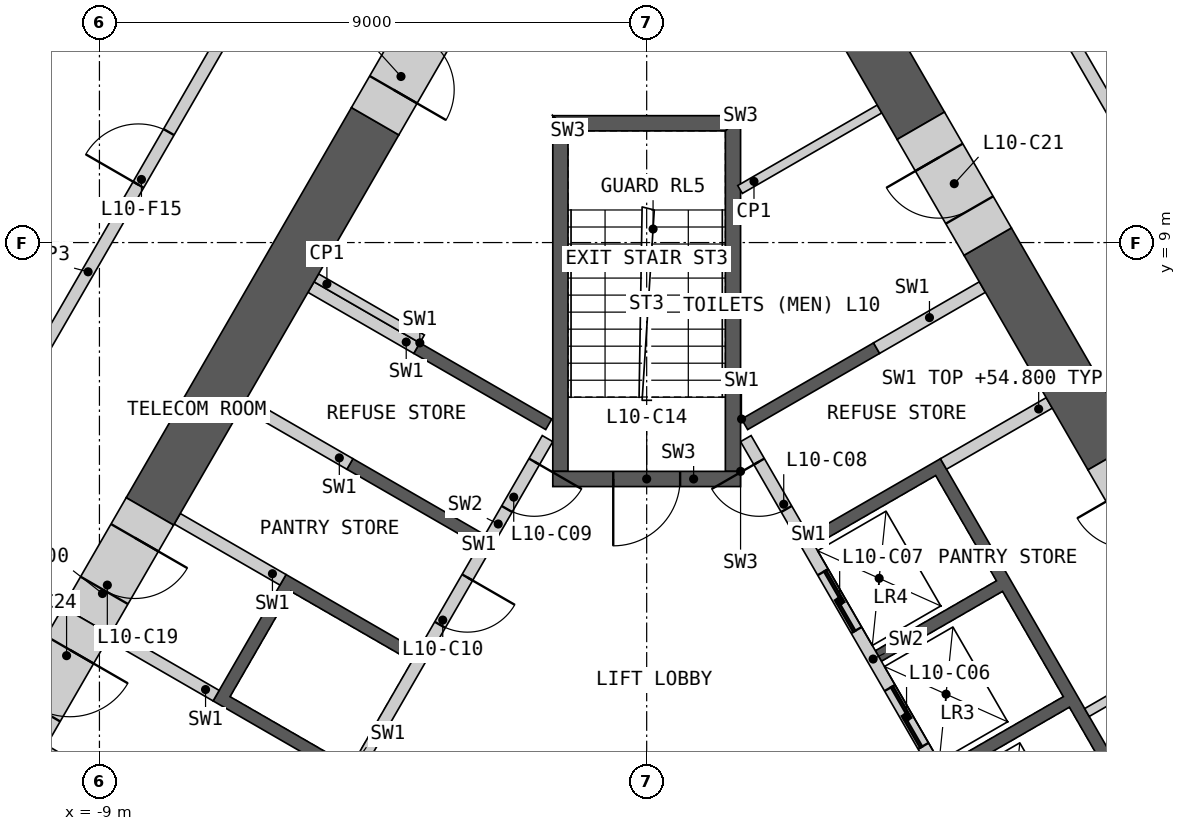
"""IFC4 building model, lengths in metres.
Left out: names, types, materials, properties, quantities, classifications, styles, units other than length and angle.
Written with IfcOpenShell. Run it as: python <this file> out.ifc"""

import sys

from ifc_helpers import new_model, si_unit, direction, frame, frame_2d, origin, place, context, subcontext, project, spatial, polyline, rectangle, outline, extrude, element, fill, save


model = new_model("IFC4")
c1 = context("Model", 3, precision=1e-05, world=origin(), true_north=direction((0.0, 1.0)))
c2 = subcontext(c1, "Body", "Model", "MODEL_VIEW")
j1 = project(units=[si_unit("LENGTHUNIT", "METRE"), si_unit("PLANEANGLEUNIT", "RADIAN")], contexts=[c1])
p1 = place(None, origin())
s1 = spatial("IfcSite", under=j1, at=p1, CompositionType="ELEMENT")
p2 = place(p1, origin())
s2 = spatial("IfcBuilding", under=s1, at=p2, CompositionType="ELEMENT")
p3 = place(p2, frame((0.0, 0.0, 51.0)))
s3 = spatial("IfcBuildingStorey", under=s2, at=p3, CompositionType="ELEMENT", Elevation=51.0)
p4 = place(p3, origin())
e1 = element("IfcWall", 1, at=p4, inside=s3, PredefinedType="SHEAR", context=c2, shape_type="SweptSolid", body=[
    extrude(outline(polyline([(1.561, 6.097), (3.731, 7.35), (3.831, 7.177), (1.66, 5.924), (1.561, 6.097)])), origin(), (0.0, 0.0, 1.0), 3.8),
])
p5 = place(p3, origin())
e2 = element("IfcWall", 2, at=p5, inside=s3, PredefinedType="SHEAR", context=c2, shape_type="SweptSolid", body=[
    extrude(outline(polyline([(2.66, 4.192), (4.831, 5.445), (8.231, -0.444), (6.061, -1.697), (5.96, -1.524), (7.952, -0.374), (6.952, 1.358), (4.96, 0.208), (4.861, 0.381), (6.852, 1.531), (5.852, 3.263), (3.861, 2.113), (3.76, 2.287), (5.752, 3.437), (4.752, 5.169), (2.76, 4.019), (2.66, 4.192)])), origin(), (0.0, 0.0, 1.0), 3.8),
])
p6 = place(p3, frame((5.817, -1.476, 0.0), z_axis=(0.0, 0.0, 1.0), x_axis=(-0.500002616675, 0.866023893041, 0.0)))
e3 = element("IfcWall", 3, at=p6, inside=s3, PredefinedType="SOLIDWALL", context=c2, shape_type="SweptSolid", body=[
    extrude(rectangle(XDim=8.373, YDim=0.2, at=frame_2d((4.187, 0.0))), origin(), (0.0, 0.0, 1.0), 3.8),
])
p7 = place(p6, frame((0.337, 0.0, 0.0)))
e4 = element("IfcOpeningElement", 4, at=p7, cuts=e3, PredefinedType="OPENING", context=c2, shape_type="SweptSolid", body=[
    extrude(rectangle(XDim=1.1, YDim=2.1, at=frame_2d((0.55, 1.05))), frame((0.0, 0.11, 0.0), z_axis=(0.0, -1.0, 0.0), x_axis=(1.0, 0.0, 0.0)), (0.0, 0.0, 1.0), 0.22),
])
p8 = place(p6, frame((2.537, 0.0, 0.0)))
e5 = element("IfcOpeningElement", 5, at=p8, cuts=e3, PredefinedType="OPENING", context=c2, shape_type="SweptSolid", body=[
    extrude(rectangle(XDim=1.1, YDim=2.1, at=frame_2d((0.55, 1.05))), frame((0.0, 0.11, 0.0), z_axis=(0.0, -1.0, 0.0), x_axis=(1.0, 0.0, 0.0)), (0.0, 0.0, 1.0), 0.22),
])
p9 = place(p6, frame((4.737, 0.0, 0.0)))
e6 = element("IfcOpeningElement", 6, at=p9, cuts=e3, PredefinedType="OPENING", context=c2, shape_type="SweptSolid", body=[
    extrude(rectangle(XDim=1.1, YDim=2.1, at=frame_2d((0.55, 1.05))), frame((0.0, 0.11, 0.0), z_axis=(0.0, -1.0, 0.0), x_axis=(1.0, 0.0, 0.0)), (0.0, 0.0, 1.0), 0.22),
])
p10 = place(p6, frame((7.037, 0.0, 0.0)))
e7 = element("IfcOpeningElement", 7, at=p10, cuts=e3, PredefinedType="OPENING", context=c2, shape_type="SweptSolid", body=[
    extrude(rectangle(XDim=0.9, YDim=2.1, at=frame_2d((0.45, 1.05))), frame((0.0, 0.11, 0.0), z_axis=(0.0, -1.0, 0.0), x_axis=(1.0, 0.0, 0.0)), (0.0, 0.0, 1.0), 0.22),
])
p11 = place(p3, frame((4.881, 5.358, 0.0), z_axis=(0.0, 0.0, 1.0), x_axis=(0.866035824272, 0.499981950752, 0.0)))
e8 = element("IfcWall", 8, at=p11, inside=s3, PredefinedType="SHEAR", context=c2, shape_type="SweptSolid", body=[
    extrude(rectangle(XDim=2.009, YDim=0.2, at=frame_2d((1.004, 0.0))), origin(), (0.0, 0.0, 1.0), 3.8),
])
p12 = place(p3, frame((3.781, 7.263, 0.0), z_axis=(0.0, 0.0, 1.0), x_axis=(0.865983199114, 0.50007309351, 0.0)))
e9 = element("IfcWall", 9, at=p12, inside=s3, PredefinedType="SHEAR", context=c2, shape_type="SweptSolid", body=[
    extrude(rectangle(XDim=2.009, YDim=0.2, at=frame_2d((1.004, 0.0))), origin(), (0.0, 0.0, 1.0), 3.8),
])
p13 = place(p3, origin())
e10 = element("IfcWall", 10, at=p13, inside=s3, PredefinedType="SHEAR", context=c2, shape_type="SweptSolid", body=[
    extrude(outline(polyline([(-4.96, 0.208), (-7.131, 1.461), (-5.931, 3.54), (-3.76, 2.287), (-3.861, 2.113), (-5.852, 3.263), (-6.852, 1.531), (-4.861, 0.381), (-4.96, 0.208)])), origin(), (0.0, 0.0, 1.0), 3.8),
])
p14 = place(p3, origin())
e11 = element("IfcWall", 11, at=p14, inside=s3, PredefinedType="SHEAR", context=c2, shape_type="SweptSolid", body=[
    extrude(outline(polyline([(-2.76, 4.019), (-4.931, 5.272), (-4.831, 5.445), (-2.66, 4.192), (-2.76, 4.019)])), origin(), (0.0, 0.0, 1.0), 3.8),
])
p15 = place(p3, origin())
e12 = element("IfcWall", 12, at=p15, inside=s3, PredefinedType="SHEAR", context=c2, shape_type="SweptSolid", body=[
    extrude(outline(polyline([(-3.731, 7.35), (-1.561, 6.097), (-1.66, 5.924), (-3.831, 7.177), (-3.731, 7.35)])), origin(), (0.0, 0.0, 1.0), 3.8),
])
p16 = place(p3, frame((-1.631, 5.776, 0.0), z_axis=(0.0, 0.0, 1.0), x_axis=(-0.499992876559, -0.866029516466, 0.0)))
e13 = element("IfcWall", 13, at=p16, inside=s3, PredefinedType="SOLIDWALL", context=c2, shape_type="SweptSolid", body=[
    extrude(rectangle(XDim=6.486, YDim=0.2, at=frame_2d((3.243, 0.0))), origin(), (0.0, 0.0, 1.0), 3.8),
])
p17 = place(p16, frame((0.437, 0.0, 0.0)))
e14 = element("IfcOpeningElement", 14, at=p17, cuts=e13, PredefinedType="OPENING", context=c2, shape_type="SweptSolid", body=[
    extrude(rectangle(XDim=0.9, YDim=2.1, at=frame_2d((0.45, 1.05))), frame((0.0, 0.11, 0.0), z_axis=(0.0, -1.0, 0.0), x_axis=(1.0, 0.0, 0.0)), (0.0, 0.0, 1.0), 0.22),
])
p18 = place(p16, frame((2.637, 0.0, 0.0)))
e15 = element("IfcOpeningElement", 15, at=p18, cuts=e13, PredefinedType="OPENING", context=c2, shape_type="SweptSolid", body=[
    extrude(rectangle(XDim=0.9, YDim=2.1, at=frame_2d((0.45, 1.05))), frame((0.0, 0.11, 0.0), z_axis=(0.0, -1.0, 0.0), x_axis=(1.0, 0.0, 0.0)), (0.0, 0.0, 1.0), 0.22),
])
p19 = place(p3, frame((-3.781, 7.263, 0.0), z_axis=(0.0, 0.0, 1.0), x_axis=(-0.865983199114, 0.50007309351, 0.0)))
e16 = element("IfcWall", 16, at=p19, inside=s3, PredefinedType="SHEAR", context=c2, shape_type="SweptSolid", body=[
    extrude(rectangle(XDim=2.009, YDim=0.2, at=frame_2d((1.004, 0.0))), origin(), (0.0, 0.0, 1.0), 3.8),
])
p20 = place(p3, frame((-4.881, 5.358, 0.0), z_axis=(0.0, 0.0, 1.0), x_axis=(-0.866035824272, 0.499981950752, 0.0)))
e17 = element("IfcWall", 17, at=p20, inside=s3, PredefinedType="SHEAR", context=c2, shape_type="SweptSolid", body=[
    extrude(rectangle(XDim=2.009, YDim=0.2, at=frame_2d((1.004, 0.0))), origin(), (0.0, 0.0, 1.0), 3.8),
])
p21 = place(p3, frame((-5.981, 3.453, 0.0), z_axis=(0.0, 0.0, 1.0), x_axis=(-0.866013584312, 0.500020471368, 0.0)))
e18 = element("IfcWall", 18, at=p21, inside=s3, PredefinedType="SHEAR", context=c2, shape_type="SweptSolid", body=[
    extrude(rectangle(XDim=2.009, YDim=0.2, at=frame_2d((1.005, 0.0))), origin(), (0.0, 0.0, 1.0), 3.8),
])
p22 = place(p3, frame((-7.081, 1.548, 0.0), z_axis=(0.0, 0.0, 1.0), x_axis=(-0.865983199114, 0.50007309351, 0.0)))
e19 = element("IfcWall", 19, at=p22, inside=s3, PredefinedType="SHEAR", context=c2, shape_type="SweptSolid", body=[
    extrude(rectangle(XDim=2.009, YDim=0.2, at=frame_2d((1.004, 0.0))), origin(), (0.0, 0.0, 1.0), 3.8),
])
p23 = place(p3, frame((-8.181, -0.357, 0.0), z_axis=(0.0, 0.0, 1.0), x_axis=(-0.866035824272, 0.499981950752, 0.0)))
e20 = element("IfcWall", 20, at=p23, inside=s3, PredefinedType="SHEAR", context=c2, shape_type="SweptSolid", body=[
    extrude(rectangle(XDim=2.009, YDim=0.2, at=frame_2d((1.004, 0.0))), origin(), (0.0, 0.0, 1.0), 3.8),
])
p24 = place(p3, origin())
e21 = element("IfcWall", 21, at=p24, inside=s3, PredefinedType="SHEAR", context=c2, shape_type="SweptSolid", body=[
    extrude(outline(polyline([(1.544, 5.237), (1.544, 11.087), (1.294, 10.837), (1.294, 5.237), (1.544, 5.237)])), origin(), (0.0, 0.0, 1.0), 3.8),
])
p25 = place(p3, origin())
e22 = element("IfcWall", 22, at=p25, inside=s3, PredefinedType="SHEAR", context=c2, shape_type="SweptSolid", body=[
    extrude(outline(polyline([(1.544, 11.087), (-1.544, 11.087), (-1.294, 10.837), (1.294, 10.837), (1.544, 11.087)])), origin(), (0.0, 0.0, 1.0), 3.8),
])
p26 = place(p3, origin())
e23 = element("IfcWall", 23, at=p26, inside=s3, PredefinedType="SHEAR", context=c2, shape_type="SweptSolid", body=[
    extrude(outline(polyline([(-1.294, 10.837), (-1.544, 11.087), (-1.544, 5.237), (-1.294, 5.237), (-1.294, 10.837)])), origin(), (0.0, 0.0, 1.0), 3.8),
])
p27 = place(p3, frame((1.544, 5.112, 0.0), z_axis=(0.0, 0.0, 1.0), x_axis=(-1.0, 0.0, 0.0)))
e24 = element("IfcWall", 24, at=p27, inside=s3, PredefinedType="SHEAR", context=c2, shape_type="SweptSolid", body=[
    extrude(rectangle(XDim=3.088, YDim=0.25, at=frame_2d((1.544, 0.0))), origin(), (0.0, 0.0, 1.0), 3.8),
])
p28 = place(p27, frame((0.994, 0.0, 0.0)))
e25 = element("IfcOpeningElement", 25, at=p28, cuts=e24, PredefinedType="OPENING", context=c2, shape_type="SweptSolid", body=[
    extrude(rectangle(XDim=1.1, YDim=2.1, at=frame_2d((0.55, 1.05))), frame((0.0, 0.135, 0.0), z_axis=(0.0, -1.0, 0.0), x_axis=(1.0, 0.0, 0.0)), (0.0, 0.0, 1.0), 0.27),
])
p29 = place(p3, frame((-3.693, 7.415, 0.0), z_axis=(0.0, 0.0, 1.0), x_axis=(-0.866035824272, 0.499981950752, 0.0)))
e26 = element("IfcWall", 26, at=p29, inside=s3, PredefinedType="PARTITIONING", context=c2, shape_type="SweptSolid", body=[
    extrude(rectangle(XDim=2.009, YDim=0.15, at=frame_2d((1.004, 0.0))), origin(), (0.0, 0.0, 1.0), 3.8),
])
p30 = place(p3, frame((3.829, 11.197, 0.0), z_axis=(0.0, 0.0, 1.0), x_axis=(-0.866016748302, -0.500014991436, 0.0)))
e27 = element("IfcWall", 27, at=p30, inside=s3, PredefinedType="PARTITIONING", context=c2, shape_type="SweptSolid", body=[
    extrude(rectangle(XDim=2.649, YDim=0.15, at=frame_2d((1.324, 0.0))), origin(), (0.0, 0.0, 1.0), 3.8),
])
p31 = place(p3, frame((8.981, 2.275, 0.0), z_axis=(0.0, 0.0, 1.0), x_axis=(-0.866013584312, -0.500020471368, 0.0)))
e28 = element("IfcWall", 28, at=p31, inside=s3, PredefinedType="PARTITIONING", context=c2, shape_type="SweptSolid", body=[
    extrude(rectangle(XDim=2.009, YDim=0.15, at=frame_2d((1.005, 0.0))), origin(), (0.0, 0.0, 1.0), 3.8),
])
p32 = place(p3, frame((7.646, 5.486, 0.0), z_axis=(0.0, 0.0, 1.0), x_axis=(-0.499978218965, 0.866037978706, 0.0)))
e29 = element("IfcWall", 29, at=p32, inside=s3, PredefinedType="SHEAR", context=c2, shape_type="SweptSolid", body=[
    extrude(rectangle(XDim=4.076, YDim=0.9, at=frame_2d((2.038, 0.0))), origin(), (0.0, 0.0, 1.0), 3.8),
])
p33 = place(p3, frame((4.509, 10.921, 0.0), z_axis=(0.0, 0.0, 1.0), x_axis=(-0.49999004381, 0.866031151917, 0.0)))
e30 = element("IfcWall", 30, at=p33, inside=s3, PredefinedType="SHEAR", context=c2, shape_type="SweptSolid", body=[
    extrude(rectangle(XDim=3.975, YDim=0.9, at=frame_2d((1.988, 0.0))), origin(), (0.0, 0.0, 1.0), 3.8),
])
p34 = place(p3, frame((-4.466, 10.995, 0.0), z_axis=(0.0, 0.0, 1.0), x_axis=(-0.500012427149, -0.866018228848, 0.0)))
e31 = element("IfcWall", 31, at=p34, inside=s3, PredefinedType="SHEAR", context=c2, shape_type="SweptSolid", body=[
    extrude(rectangle(XDim=7.409, YDim=0.9, at=frame_2d((3.705, 0.0))), origin(), (0.0, 0.0, 1.0), 3.8),
])
p35 = place(p3, frame((-8.17, 4.579, 0.0), z_axis=(0.0, 0.0, 1.0), x_axis=(-0.499888406853, -0.866089822532, 0.0)))
e32 = element("IfcWall", 32, at=p35, inside=s3, PredefinedType="SHEAR", context=c2, shape_type="SweptSolid", body=[
    extrude(rectangle(XDim=2.08, YDim=0.9, at=frame_2d((1.04, 0.0))), origin(), (0.0, 0.0, 1.0), 3.8),
])
p36 = place(p35, frame((0.5, 0.0, 0.0)))
e33 = element("IfcOpeningElement", 33, at=p36, cuts=e32, PredefinedType="OPENING", context=c2, shape_type="SweptSolid", body=[
    extrude(rectangle(XDim=1.0, YDim=2.1, at=frame_2d((0.5, 1.05))), frame((0.0, 0.46, 0.0), z_axis=(0.0, -1.0, 0.0), x_axis=(1.0, 0.0, 0.0)), (0.0, 0.0, 1.0), 0.92),
])
p37 = place(p3, frame((8.747, 3.58, 0.0), z_axis=(0.0, 0.0, 1.0), x_axis=(-0.50002983664, 0.866008176907, 0.0)))
e34 = element("IfcWall", 34, at=p37, inside=s3, PredefinedType="SHEAR", context=c2, shape_type="SweptSolid", body=[
    extrude(rectangle(XDim=2.2, YDim=0.9, at=frame_2d((1.1, 0.0))), origin(), (0.0, 0.0, 1.0), 3.8),
])
p38 = place(p37, frame((0.6, 0.0, 0.0)))
e35 = element("IfcOpeningElement", 35, at=p38, cuts=e34, PredefinedType="OPENING", context=c2, shape_type="SweptSolid", body=[
    extrude(rectangle(XDim=1.0, YDim=2.1, at=frame_2d((0.5, 1.05))), frame((0.0, 0.46, 0.0), z_axis=(0.0, -1.0, 0.0), x_axis=(1.0, 0.0, 0.0)), (0.0, 0.0, 1.0), 0.92),
])
p39 = place(p3, frame((5.608, 9.016, 0.0), z_axis=(0.0, 0.0, 1.0), x_axis=(-0.499994660107, 0.866028486751, 0.0)))
e36 = element("IfcWall", 36, at=p39, inside=s3, PredefinedType="SHEAR", context=c2, shape_type="SweptSolid", body=[
    extrude(rectangle(XDim=2.2, YDim=0.9, at=frame_2d((1.1, 0.0))), origin(), (0.0, 0.0, 1.0), 3.8),
])
p40 = place(p39, frame((0.6, 0.0, 0.0)))
e37 = element("IfcOpeningElement", 37, at=p40, cuts=e36, PredefinedType="OPENING", context=c2, shape_type="SweptSolid", body=[
    extrude(rectangle(XDim=1.0, YDim=2.1, at=frame_2d((0.5, 1.05))), frame((0.0, 0.46, 0.0), z_axis=(0.0, -1.0, 0.0), x_axis=(1.0, 0.0, 0.0)), (0.0, 0.0, 1.0), 0.92),
])
p41 = place(p3, frame((-3.365, 12.9, 0.0), z_axis=(0.0, 0.0, 1.0), x_axis=(-0.500077893725, -0.86598042715, 0.0)))
e38 = element("IfcWall", 38, at=p41, inside=s3, PredefinedType="SHEAR", context=c2, shape_type="SweptSolid", body=[
    extrude(rectangle(XDim=2.2, YDim=0.9, at=frame_2d((1.1, 0.0))), origin(), (0.0, 0.0, 1.0), 3.8),
])
p42 = place(p41, frame((0.6, 0.0, 0.0)))
e39 = element("IfcOpeningElement", 39, at=p42, cuts=e38, PredefinedType="OPENING", context=c2, shape_type="SweptSolid", body=[
    extrude(rectangle(XDim=1.0, YDim=2.1, at=frame_2d((0.5, 1.05))), frame((0.0, 0.46, 0.0), z_axis=(0.0, -1.0, 0.0), x_axis=(1.0, 0.0, 0.0)), (0.0, 0.0, 1.0), 0.92),
])
p43 = place(p3, frame((-9.21, 2.777, 0.0), z_axis=(0.0, 0.0, 1.0), x_axis=(-0.500077893725, -0.86598042715, 0.0)))
e40 = element("IfcWall", 40, at=p43, inside=s3, PredefinedType="SHEAR", context=c2, shape_type="SweptSolid", body=[
    extrude(rectangle(XDim=2.2, YDim=0.9, at=frame_2d((1.1, 0.0))), origin(), (0.0, 0.0, 1.0), 3.8),
])
p44 = place(p43, frame((0.55, 0.0, 0.0)))
e41 = element("IfcOpeningElement", 41, at=p44, cuts=e40, PredefinedType="OPENING", context=c2, shape_type="SweptSolid", body=[
    extrude(rectangle(XDim=1.1, YDim=2.1, at=frame_2d((0.55, 1.05))), frame((0.0, 0.46, 0.0), z_axis=(0.0, -1.0, 0.0), x_axis=(1.0, 0.0, 0.0)), (0.0, 0.0, 1.0), 0.92),
])
p45 = place(p3, frame((-10.439, 6.35, 0.0), z_axis=(0.0, 0.0, 1.0), x_axis=(0.50001002959, 0.86601961312, 0.0)))
e42 = element("IfcWall", 42, at=p45, inside=s3, PredefinedType="PARTITIONING", context=c2, shape_type="SweptSolid", body=[
    extrude(rectangle(XDim=10.019, YDim=0.2, at=frame_2d((5.009, 0.0))), origin(), (0.0, 0.0, 1.0), 3.8),
])
p46 = place(p45, frame((4.159, 0.0, 0.0)))
e43 = element("IfcOpeningElement", 43, at=p46, cuts=e42, PredefinedType="OPENING", context=c2, shape_type="SweptSolid", body=[
    extrude(rectangle(XDim=1.0, YDim=2.1, at=frame_2d((0.5, 1.05))), frame((0.0, 0.11, 0.0), z_axis=(0.0, -1.0, 0.0), x_axis=(1.0, 0.0, 0.0)), (0.0, 0.0, 1.0), 0.22),
])
p47 = place(p3, frame((5.429, 15.026, 0.0), z_axis=(0.0, 0.0, 1.0), x_axis=(0.50001002959, -0.86601961312, 0.0)))
e44 = element("IfcWall", 44, at=p47, inside=s3, PredefinedType="PARTITIONING", context=c2, shape_type="SweptSolid", body=[
    extrude(rectangle(XDim=10.019, YDim=0.2, at=frame_2d((5.009, 0.0))), origin(), (0.0, 0.0, 1.0), 3.8),
])
p48 = place(p47, frame((4.86, 0.0, 0.0)))
e45 = element("IfcOpeningElement", 45, at=p48, cuts=e44, PredefinedType="OPENING", context=c2, shape_type="SweptSolid", body=[
    extrude(rectangle(XDim=1.0, YDim=2.1, at=frame_2d((0.5, 1.05))), frame((0.0, 0.11, 0.0), z_axis=(0.0, -1.0, 0.0), x_axis=(1.0, 0.0, 0.0)), (0.0, 0.0, 1.0), 0.22),
])
p49 = place(p8, origin())
e46 = element("IfcDoor", 46, at=p49, inside=s3, OperationType="SLIDING_TO_LEFT", PredefinedType="DOOR", context=c2, shape_type="SweptSolid", body=[
    extrude(rectangle(XDim=1.1, YDim=2.1, at=frame_2d((0.55, 1.05))), frame((0.0, 0.025, 0.0), z_axis=(0.0, -1.0, 0.0), x_axis=(1.0, 0.0, 0.0)), (0.0, 0.0, 1.0), 0.05),
])
fill(e5, e46)
p50 = place(p9, origin())
e47 = element("IfcDoor", 47, at=p50, inside=s3, OperationType="SLIDING_TO_LEFT", PredefinedType="DOOR", context=c2, shape_type="SweptSolid", body=[
    extrude(rectangle(XDim=1.1, YDim=2.1, at=frame_2d((0.55, 1.05))), frame((0.0, 0.025, 0.0), z_axis=(0.0, -1.0, 0.0), x_axis=(1.0, 0.0, 0.0)), (0.0, 0.0, 1.0), 0.05),
])
fill(e6, e47)
p51 = place(p10, origin())
e48 = element("IfcDoor", 48, at=p51, inside=s3, OperationType="SINGLE_SWING_RIGHT", PredefinedType="DOOR", context=c2, shape_type="SweptSolid", body=[
    extrude(rectangle(XDim=0.9, YDim=2.1, at=frame_2d((0.45, 1.05))), frame((0.0, 0.025, 0.0), z_axis=(0.0, -1.0, 0.0), x_axis=(1.0, 0.0, 0.0)), (0.0, 0.0, 1.0), 0.05),
])
fill(e7, e48)
p52 = place(p17, origin())
e49 = element("IfcDoor", 49, at=p52, inside=s3, OperationType="SINGLE_SWING_LEFT", PredefinedType="DOOR", context=c2, shape_type="SweptSolid", body=[
    extrude(rectangle(XDim=0.9, YDim=2.1, at=frame_2d((0.45, 1.05))), frame((0.0, 0.025, 0.0), z_axis=(0.0, -1.0, 0.0), x_axis=(1.0, 0.0, 0.0)), (0.0, 0.0, 1.0), 0.05),
])
fill(e14, e49)
p53 = place(p18, origin())
e50 = element("IfcDoor", 50, at=p53, inside=s3, OperationType="SINGLE_SWING_LEFT", PredefinedType="DOOR", context=c2, shape_type="SweptSolid", body=[
    extrude(rectangle(XDim=0.9, YDim=2.1, at=frame_2d((0.45, 1.05))), frame((0.0, 0.025, 0.0), z_axis=(0.0, -1.0, 0.0), x_axis=(1.0, 0.0, 0.0)), (0.0, 0.0, 1.0), 0.05),
])
fill(e15, e50)
p54 = place(p28, origin())
e51 = element("IfcDoor", 51, at=p54, inside=s3, OperationType="SINGLE_SWING_RIGHT", PredefinedType="DOOR", context=c2, shape_type="SweptSolid", body=[
    extrude(rectangle(XDim=1.1, YDim=2.1, at=frame_2d((0.55, 1.05))), frame((0.0, 0.025, 0.0), z_axis=(0.0, -1.0, 0.0), x_axis=(1.0, 0.0, 0.0)), (0.0, 0.0, 1.0), 0.05),
])
fill(e25, e51)
p55 = place(p36, origin())
e52 = element("IfcDoor", 52, at=p55, inside=s3, OperationType="SINGLE_SWING_LEFT", PredefinedType="DOOR", context=c2, shape_type="SweptSolid", body=[
    extrude(rectangle(XDim=1.0, YDim=2.1, at=frame_2d((0.5, 1.05))), frame((0.0, 0.205, 0.0), z_axis=(0.0, -1.0, 0.0), x_axis=(1.0, 0.0, 0.0)), (0.0, 0.0, 1.0), 0.05),
])
fill(e33, e52)
p56 = place(p40, origin())
e53 = element("IfcDoor", 53, at=p56, inside=s3, OperationType="SINGLE_SWING_RIGHT", PredefinedType="DOOR", context=c2, shape_type="SweptSolid", body=[
    extrude(rectangle(XDim=1.0, YDim=2.1, at=frame_2d((0.5, 1.05))), frame((0.0, 0.205, 0.0), z_axis=(0.0, -1.0, 0.0), x_axis=(1.0, 0.0, 0.0)), (0.0, 0.0, 1.0), 0.05),
])
fill(e37, e53)
p57 = place(p42, origin())
e54 = element("IfcDoor", 54, at=p57, inside=s3, OperationType="SINGLE_SWING_RIGHT", PredefinedType="DOOR", context=c2, shape_type="SweptSolid", body=[
    extrude(rectangle(XDim=1.0, YDim=2.1, at=frame_2d((0.5, 1.05))), frame((0.0, 0.205, 0.0), z_axis=(0.0, -1.0, 0.0), x_axis=(1.0, 0.0, 0.0)), (0.0, 0.0, 1.0), 0.05),
])
fill(e39, e54)
p58 = place(p44, origin())
e55 = element("IfcDoor", 55, at=p58, inside=s3, OperationType="SINGLE_SWING_LEFT", PredefinedType="DOOR", context=c2, shape_type="SweptSolid", body=[
    extrude(rectangle(XDim=1.1, YDim=2.1, at=frame_2d((0.55, 1.05))), frame((0.0, 0.205, 0.0), z_axis=(0.0, -1.0, 0.0), x_axis=(1.0, 0.0, 0.0)), (0.0, 0.0, 1.0), 0.05),
])
fill(e41, e55)
p59 = place(p46, origin())
e56 = element("IfcDoor", 56, at=p59, inside=s3, OperationType="SINGLE_SWING_LEFT", PredefinedType="DOOR", context=c2, shape_type="SweptSolid", body=[
    extrude(rectangle(XDim=1.0, YDim=2.1, at=frame_2d((0.5, 1.05))), frame((0.0, 0.025, 0.0), z_axis=(0.0, -1.0, 0.0), x_axis=(1.0, 0.0, 0.0)), (0.0, 0.0, 1.0), 0.05),
])
fill(e43, e56)
save(model, sys.argv[1])
